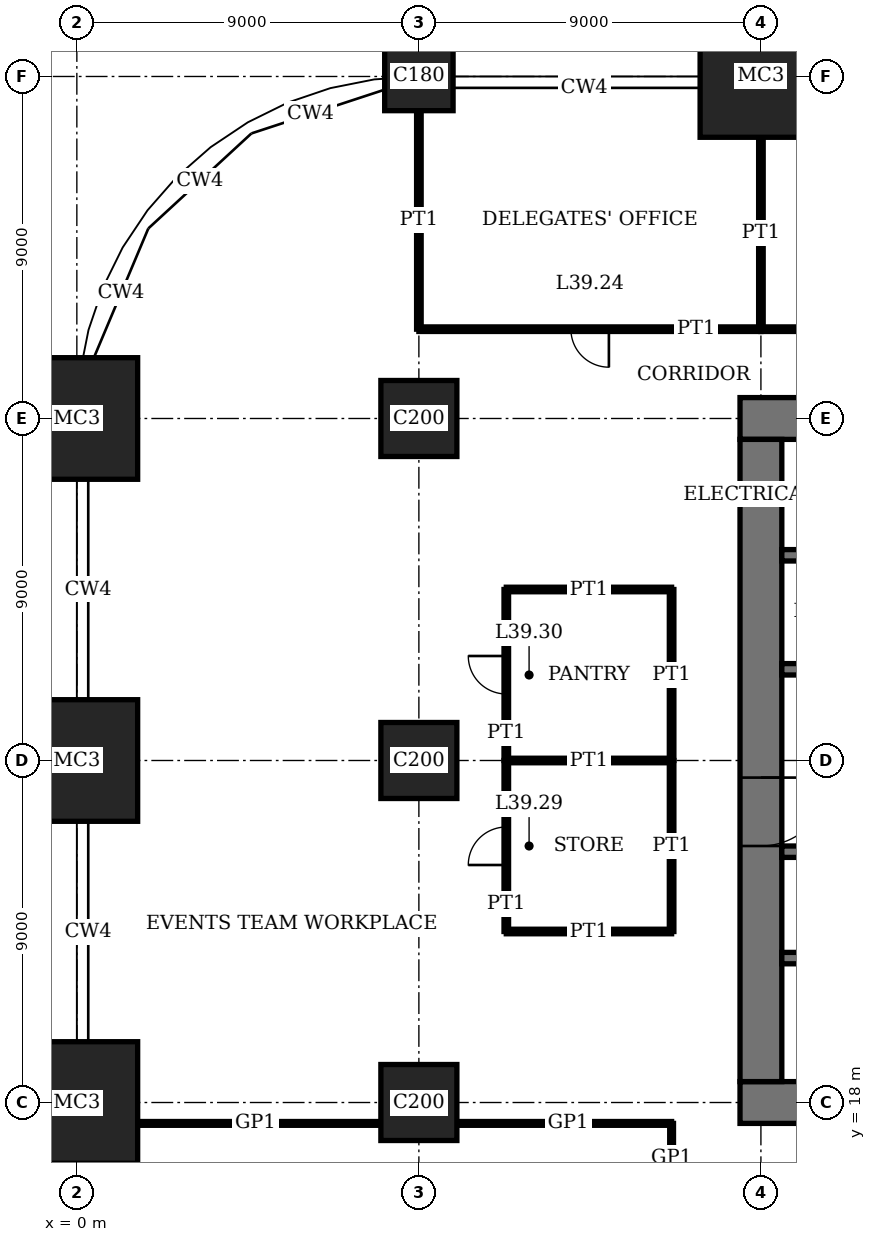
"""IFC4 building model, lengths in metres.
Left out: names, types, materials, properties, quantities, classifications, styles, units other than length and angle.
Written with IfcOpenShell. Run it as: python <this file> out.ifc"""

import sys

from ifc_helpers import new_model, si_unit, direction, frame, frame_2d, origin, origin_2d, place, context, subcontext, project, spatial, rectangle, extrude, element, fill, save


model = new_model("IFC4")
c1 = context("Model", 3, precision=1e-05, world=origin(), true_north=direction((0.0, 1.0)))
c2 = subcontext(c1, "Body", "Model", "MODEL_VIEW")
j1 = project(units=[si_unit("LENGTHUNIT", "METRE"), si_unit("PLANEANGLEUNIT", "RADIAN")], contexts=[c1])
p1 = place(None, origin())
s1 = spatial("IfcSite", under=j1, at=p1, CompositionType="ELEMENT")
p2 = place(p1, origin())
s2 = spatial("IfcBuilding", under=s1, at=p2, CompositionType="ELEMENT")
p3 = place(p2, frame((0.0, 0.0, 162.2)))
s3 = spatial("IfcBuildingStorey", under=s2, at=p3, CompositionType="ELEMENT", Elevation=162.2)
for number, where, z_axis, x_axis in (
    (1, (0.0, 18.0, 0.0), (0.0, 0.0, 1.0), (1.0, 0.0, 0.0)),
    (2, (0.0, 27.0, 0.0), (0.0, 0.0, 1.0), (1.0, 0.0, 0.0)),
    (3, (0.0, 36.0, 0.0), (0.0, 0.0, 1.0), (1.0, 0.0, 0.0)),
):
    element("IfcColumn", number, at=place(p3, frame(where, z_axis=z_axis, x_axis=x_axis)), inside=s3, PredefinedType="COLUMN", context=c2, shape_type="SweptSolid", body=[
        extrude(rectangle(XDim=3.2, YDim=3.2, at=origin_2d()), origin(), (0.0, 0.0, 1.0), 4.0),
    ])
for number, where, z_axis, x_axis in (
    (4, (9.0, 18.0, 0.0), (0.0, 0.0, 1.0), (1.0, 0.0, 0.0)),
    (5, (9.0, 27.0, 0.0), (0.0, 0.0, 1.0), (1.0, 0.0, 0.0)),
    (6, (9.0, 36.0, 0.0), (0.0, 0.0, 1.0), (1.0, 0.0, 0.0)),
):
    element("IfcColumn", number, at=place(p3, frame(where, z_axis=z_axis, x_axis=x_axis)), inside=s3, PredefinedType="COLUMN", context=c2, shape_type="SweptSolid", body=[
        extrude(rectangle(XDim=2.0, YDim=2.0, at=origin_2d()), origin(), (0.0, 0.0, 1.0), 4.0),
    ])
p4 = place(p3, frame((9.0, 45.0, 0.0), z_axis=(0.0, 0.0, 1.0), x_axis=(1.0, 0.0, 0.0)))
e7 = element("IfcColumn", 7, at=p4, inside=s3, PredefinedType="COLUMN", context=c2, shape_type="SweptSolid", body=[
    extrude(rectangle(XDim=1.8, YDim=1.8, at=origin_2d()), origin(), (0.0, 0.0, 1.0), 4.0),
])
p5 = place(p3, frame((18.0, 45.0, 0.0), z_axis=(0.0, 0.0, 1.0), x_axis=(1.0, 0.0, 0.0)))
e8 = element("IfcColumn", 8, at=p5, inside=s3, PredefinedType="COLUMN", context=c2, shape_type="SweptSolid", body=[
    extrude(rectangle(XDim=3.2, YDim=3.2, at=origin_2d()), origin(), (0.0, 0.0, 1.0), 4.0),
])
p6 = place(p3, frame((17.45, 18.0, 0.0), z_axis=(0.0, 0.0, 1.0), x_axis=(1.0, 0.0, 0.0)))
e9 = element("IfcWall", 9, at=p6, inside=s3, PredefinedType="SHEAR", context=c2, shape_type="SweptSolid", body=[
    extrude(rectangle(XDim=28.1, YDim=1.1, at=frame_2d((14.05, 0.0))), origin(), (0.0, 0.0, 1.0), 4.0),
])
p7 = place(p6, frame((11.55, 0.0, 0.0)))
e10 = element("IfcOpeningElement", 10, at=p7, cuts=e9, PredefinedType="OPENING", context=c2, shape_type="SweptSolid", body=[
    extrude(rectangle(XDim=1.0, YDim=2.4, at=frame_2d((0.5, 1.2))), frame((0.0, 0.56, 0.0), z_axis=(0.0, -1.0, 0.0), x_axis=(1.0, 0.0, 0.0)), (0.0, 0.0, 1.0), 1.12),
])
p8 = place(p6, frame((16.55, 0.0, 0.0)))
e11 = element("IfcOpeningElement", 11, at=p8, cuts=e9, PredefinedType="OPENING", context=c2, shape_type="SweptSolid", body=[
    extrude(rectangle(XDim=1.0, YDim=2.4, at=frame_2d((0.5, 1.2))), frame((0.0, 0.56, 0.0), z_axis=(0.0, -1.0, 0.0), x_axis=(1.0, 0.0, 0.0)), (0.0, 0.0, 1.0), 1.12),
])
p9 = place(p6, frame((20.0, 0.0, 0.0)))
e12 = element("IfcOpeningElement", 12, at=p9, cuts=e9, PredefinedType="OPENING", context=c2, shape_type="SweptSolid", body=[
    extrude(rectangle(XDim=1.1, YDim=2.4, at=frame_2d((0.55, 1.2))), frame((0.0, 0.56, 0.0), z_axis=(0.0, -1.0, 0.0), x_axis=(1.0, 0.0, 0.0)), (0.0, 0.0, 1.0), 1.12),
])
p10 = place(p6, frame((24.05, 0.0, 0.0)))
e13 = element("IfcOpeningElement", 13, at=p10, cuts=e9, PredefinedType="OPENING", context=c2, shape_type="SweptSolid", body=[
    extrude(rectangle(XDim=1.0, YDim=2.4, at=frame_2d((0.5, 1.2))), frame((0.0, 0.56, 0.0), z_axis=(0.0, -1.0, 0.0), x_axis=(1.0, 0.0, 0.0)), (0.0, 0.0, 1.0), 1.12),
])
p11 = place(p3, frame((45.55, 36.0, 0.0), z_axis=(0.0, 0.0, 1.0), x_axis=(-1.0, 0.0, 0.0)))
e14 = element("IfcWall", 14, at=p11, inside=s3, PredefinedType="SHEAR", context=c2, shape_type="SweptSolid", body=[
    extrude(rectangle(XDim=28.1, YDim=1.1, at=frame_2d((14.05, 0.0))), origin(), (0.0, 0.0, 1.0), 4.0),
])
p12 = place(p11, frame((11.55, 0.0, 0.0)))
e15 = element("IfcOpeningElement", 15, at=p12, cuts=e14, PredefinedType="OPENING", context=c2, shape_type="SweptSolid", body=[
    extrude(rectangle(XDim=1.0, YDim=2.4, at=frame_2d((0.5, 1.2))), frame((0.0, 0.56, 0.0), z_axis=(0.0, -1.0, 0.0), x_axis=(1.0, 0.0, 0.0)), (0.0, 0.0, 1.0), 1.12),
])
p13 = place(p11, frame((16.55, 0.0, 0.0)))
e16 = element("IfcOpeningElement", 16, at=p13, cuts=e14, PredefinedType="OPENING", context=c2, shape_type="SweptSolid", body=[
    extrude(rectangle(XDim=1.0, YDim=2.4, at=frame_2d((0.5, 1.2))), frame((0.0, 0.56, 0.0), z_axis=(0.0, -1.0, 0.0), x_axis=(1.0, 0.0, 0.0)), (0.0, 0.0, 1.0), 1.12),
])
p14 = place(p11, frame((20.0, 0.0, 0.0)))
e17 = element("IfcOpeningElement", 17, at=p14, cuts=e14, PredefinedType="OPENING", context=c2, shape_type="SweptSolid", body=[
    extrude(rectangle(XDim=1.1, YDim=2.4, at=frame_2d((0.55, 1.2))), frame((0.0, 0.56, 0.0), z_axis=(0.0, -1.0, 0.0), x_axis=(1.0, 0.0, 0.0)), (0.0, 0.0, 1.0), 1.12),
])
p15 = place(p11, frame((24.05, 0.0, 0.0)))
e18 = element("IfcOpeningElement", 18, at=p15, cuts=e14, PredefinedType="OPENING", context=c2, shape_type="SweptSolid", body=[
    extrude(rectangle(XDim=1.0, YDim=2.4, at=frame_2d((0.5, 1.2))), frame((0.0, 0.56, 0.0), z_axis=(0.0, -1.0, 0.0), x_axis=(1.0, 0.0, 0.0)), (0.0, 0.0, 1.0), 1.12),
])
p16 = place(p3, frame((18.0, 35.45, 0.0), z_axis=(0.0, 0.0, 1.0), x_axis=(0.0, -1.0, 0.0)))
e19 = element("IfcWall", 19, at=p16, inside=s3, PredefinedType="SHEAR", context=c2, shape_type="SweptSolid", body=[
    extrude(rectangle(XDim=16.9, YDim=1.1, at=frame_2d((8.45, 0.0))), origin(), (0.0, 0.0, 1.0), 4.0),
])
p17 = place(p16, frame((8.9, 0.0, 0.0)))
e20 = element("IfcOpeningElement", 20, at=p17, cuts=e19, PredefinedType="OPENING", context=c2, shape_type="SweptSolid", body=[
    extrude(rectangle(XDim=1.8, YDim=2.4, at=frame_2d((0.9, 1.2))), frame((0.0, 0.56, 0.0), z_axis=(0.0, -1.0, 0.0), x_axis=(1.0, 0.0, 0.0)), (0.0, 0.0, 1.0), 1.12),
])
p18 = place(p3, frame((18.55, 21.8, 0.0), z_axis=(0.0, 0.0, 1.0), x_axis=(1.0, 0.0, 0.0)))
e21 = element("IfcWall", 21, at=p18, inside=s3, PredefinedType="SHEAR", context=c2, shape_type="SweptSolid", body=[
    extrude(rectangle(XDim=8.3, YDim=0.3, at=frame_2d((4.15, 0.0))), origin(), (0.0, 0.0, 1.0), 4.0),
])
p19 = place(p18, frame((6.85, 0.0, 0.0)))
e22 = element("IfcOpeningElement", 22, at=p19, cuts=e21, PredefinedType="OPENING", context=c2, shape_type="SweptSolid", body=[
    extrude(rectangle(XDim=1.0, YDim=2.4, at=frame_2d((0.5, 1.2))), frame((0.0, 0.16, 0.0), z_axis=(0.0, -1.0, 0.0), x_axis=(1.0, 0.0, 0.0)), (0.0, 0.0, 1.0), 0.32),
])
p20 = place(p3, frame((18.55, 24.6, 0.0), z_axis=(0.0, 0.0, 1.0), x_axis=(1.0, 0.0, 0.0)))
e23 = element("IfcWall", 23, at=p20, inside=s3, PredefinedType="SHEAR", context=c2, shape_type="SweptSolid", body=[
    extrude(rectangle(XDim=25.9, YDim=0.3, at=frame_2d((12.95, 0.0))), origin(), (0.0, 0.0, 1.0), 4.0),
])
p21 = place(p20, frame((4.95, 0.0, 0.0)))
e24 = element("IfcOpeningElement", 24, at=p21, cuts=e23, PredefinedType="OPENING", context=c2, shape_type="SweptSolid", body=[
    extrude(rectangle(XDim=1.0, YDim=2.4, at=frame_2d((0.5, 1.2))), frame((0.0, 0.16, 0.0), z_axis=(0.0, -1.0, 0.0), x_axis=(1.0, 0.0, 0.0)), (0.0, 0.0, 1.0), 0.32),
])
p22 = place(p20, frame((24.5, 0.0, 0.0)))
e25 = element("IfcOpeningElement", 25, at=p22, cuts=e23, PredefinedType="OPENING", context=c2, shape_type="SweptSolid", body=[
    extrude(rectangle(XDim=0.9, YDim=2.1, at=frame_2d((0.45, 1.05))), frame((0.0, 0.16, 0.0), z_axis=(0.0, -1.0, 0.0), x_axis=(1.0, 0.0, 0.0)), (0.0, 0.0, 1.0), 0.32),
])
p23 = place(p20, frame((21.3, 0.0, 0.0)))
e26 = element("IfcOpeningElement", 26, at=p23, cuts=e23, PredefinedType="OPENING", context=c2, shape_type="SweptSolid", body=[
    extrude(rectangle(XDim=1.3, YDim=2.4, at=frame_2d((0.65, 1.2))), frame((0.0, 0.16, 0.0), z_axis=(0.0, -1.0, 0.0), x_axis=(1.0, 0.0, 0.0)), (0.0, 0.0, 1.0), 0.32),
])
p24 = place(p3, frame((18.55, 29.4, 0.0), z_axis=(0.0, 0.0, 1.0), x_axis=(1.0, 0.0, 0.0)))
e27 = element("IfcWall", 27, at=p24, inside=s3, PredefinedType="SHEAR", context=c2, shape_type="SweptSolid", body=[
    extrude(rectangle(XDim=25.9, YDim=0.3, at=frame_2d((12.95, 0.0))), origin(), (0.0, 0.0, 1.0), 4.0),
])
p25 = place(p24, frame((19.95, 0.0, 0.0)))
e28 = element("IfcOpeningElement", 28, at=p25, cuts=e27, PredefinedType="OPENING", context=c2, shape_type="SweptSolid", body=[
    extrude(rectangle(XDim=1.0, YDim=2.4, at=frame_2d((0.5, 1.2))), frame((0.0, 0.16, 0.0), z_axis=(0.0, -1.0, 0.0), x_axis=(1.0, 0.0, 0.0)), (0.0, 0.0, 1.0), 0.32),
])
p26 = place(p24, frame((0.5, 0.0, 0.0)))
e29 = element("IfcOpeningElement", 29, at=p26, cuts=e27, PredefinedType="OPENING", context=c2, shape_type="SweptSolid", body=[
    extrude(rectangle(XDim=0.9, YDim=2.1, at=frame_2d((0.45, 1.05))), frame((0.0, 0.16, 0.0), z_axis=(0.0, -1.0, 0.0), x_axis=(1.0, 0.0, 0.0)), (0.0, 0.0, 1.0), 0.32),
])
p27 = place(p24, frame((15.45, 0.0, 0.0)))
e30 = element("IfcOpeningElement", 30, at=p27, cuts=e27, PredefinedType="OPENING", context=c2, shape_type="SweptSolid", body=[
    extrude(rectangle(XDim=1.0, YDim=2.4, at=frame_2d((0.5, 1.2))), frame((0.0, 0.16, 0.0), z_axis=(0.0, -1.0, 0.0), x_axis=(1.0, 0.0, 0.0)), (0.0, 0.0, 1.0), 0.32),
])
p28 = place(p24, frame((12.45, 0.0, 0.0)))
e31 = element("IfcOpeningElement", 31, at=p28, cuts=e27, PredefinedType="OPENING", context=c2, shape_type="SweptSolid", body=[
    extrude(rectangle(XDim=1.0, YDim=2.4, at=frame_2d((0.5, 1.2))), frame((0.0, 0.16, 0.0), z_axis=(0.0, -1.0, 0.0), x_axis=(1.0, 0.0, 0.0)), (0.0, 0.0, 1.0), 0.32),
])
p29 = place(p24, frame((9.4, 0.0, 0.0)))
e32 = element("IfcOpeningElement", 32, at=p29, cuts=e27, PredefinedType="OPENING", context=c2, shape_type="SweptSolid", body=[
    extrude(rectangle(XDim=1.1, YDim=2.4, at=frame_2d((0.55, 1.2))), frame((0.0, 0.16, 0.0), z_axis=(0.0, -1.0, 0.0), x_axis=(1.0, 0.0, 0.0)), (0.0, 0.0, 1.0), 0.32),
])
p30 = place(p24, frame((6.4, 0.0, 0.0)))
e33 = element("IfcOpeningElement", 33, at=p30, cuts=e27, PredefinedType="OPENING", context=c2, shape_type="SweptSolid", body=[
    extrude(rectangle(XDim=1.1, YDim=2.4, at=frame_2d((0.55, 1.2))), frame((0.0, 0.16, 0.0), z_axis=(0.0, -1.0, 0.0), x_axis=(1.0, 0.0, 0.0)), (0.0, 0.0, 1.0), 0.32),
])
p31 = place(p24, frame((3.3, 0.0, 0.0)))
e34 = element("IfcOpeningElement", 34, at=p31, cuts=e27, PredefinedType="OPENING", context=c2, shape_type="SweptSolid", body=[
    extrude(rectangle(XDim=1.3, YDim=2.4, at=frame_2d((0.65, 1.2))), frame((0.0, 0.16, 0.0), z_axis=(0.0, -1.0, 0.0), x_axis=(1.0, 0.0, 0.0)), (0.0, 0.0, 1.0), 0.32),
])
p32 = place(p3, frame((18.55, 32.4, 0.0), z_axis=(0.0, 0.0, 1.0), x_axis=(1.0, 0.0, 0.0)))
e35 = element("IfcWall", 35, at=p32, inside=s3, PredefinedType="SHEAR", context=c2, shape_type="SweptSolid", body=[
    extrude(rectangle(XDim=17.3, YDim=0.3, at=frame_2d((8.65, 0.0))), origin(), (0.0, 0.0, 1.0), 4.0),
])
p33 = place(p3, frame((1.6, 17.45, 0.0), z_axis=(0.0, 0.0, 1.0), x_axis=(1.0, 0.0, 0.0)))
e36 = element("IfcWall", 36, at=p33, inside=s3, PredefinedType="PARTITIONING", context=c2, shape_type="SweptSolid", body=[
    extrude(rectangle(XDim=6.4, YDim=0.1, at=frame_2d((3.2, 0.0))), origin(), (0.0, 0.0, 1.0), 3.05),
])
p34 = place(p3, frame((10.0, 17.45, 0.0), z_axis=(0.0, 0.0, 1.0), x_axis=(1.0, 0.0, 0.0)))
e37 = element("IfcWall", 37, at=p34, inside=s3, PredefinedType="PARTITIONING", context=c2, shape_type="SweptSolid", body=[
    extrude(rectangle(XDim=5.65, YDim=0.1, at=frame_2d((2.825, 0.0))), origin(), (0.0, 0.0, 1.0), 3.05),
])
p35 = place(p3, frame((11.3, 22.5, 0.0), z_axis=(0.0, 0.0, 1.0), x_axis=(1.0, 0.0, 0.0)))
e38 = element("IfcWall", 38, at=p35, inside=s3, PredefinedType="PARTITIONING", context=c2, shape_type="SweptSolid", body=[
    extrude(rectangle(XDim=4.35, YDim=0.12, at=frame_2d((2.175, 0.0))), origin(), (0.0, 0.0, 1.0), 3.1),
])
p36 = place(p3, frame((11.3, 27.0, 0.0), z_axis=(0.0, 0.0, 1.0), x_axis=(1.0, 0.0, 0.0)))
e39 = element("IfcWall", 39, at=p36, inside=s3, PredefinedType="PARTITIONING", context=c2, shape_type="SweptSolid", body=[
    extrude(rectangle(XDim=4.35, YDim=0.12, at=frame_2d((2.175, 0.0))), origin(), (0.0, 0.0, 1.0), 3.05),
])
p37 = place(p3, frame((11.3, 31.5, 0.0), z_axis=(0.0, 0.0, 1.0), x_axis=(1.0, 0.0, 0.0)))
e40 = element("IfcWall", 40, at=p37, inside=s3, PredefinedType="PARTITIONING", context=c2, shape_type="SweptSolid", body=[
    extrude(rectangle(XDim=4.35, YDim=0.12, at=frame_2d((2.175, 0.0))), origin(), (0.0, 0.0, 1.0), 3.1),
])
p38 = place(p3, frame((9.0, 38.35, 0.0), z_axis=(0.0, 0.0, 1.0), x_axis=(1.0, 0.0, 0.0)))
e41 = element("IfcWall", 41, at=p38, inside=s3, PredefinedType="PARTITIONING", context=c2, shape_type="SweptSolid", body=[
    extrude(rectangle(XDim=9.0, YDim=0.12, at=frame_2d((4.5, 0.0))), origin(), (0.0, 0.0, 1.0), 3.75),
])
p39 = place(p38, frame((4.0, 0.0, 0.0)))
e42 = element("IfcOpeningElement", 42, at=p39, cuts=e41, PredefinedType="OPENING", context=c2, shape_type="SweptSolid", body=[
    extrude(rectangle(XDim=1.0, YDim=2.4, at=frame_2d((0.5, 1.2))), frame((0.0, 0.07, 0.0), z_axis=(0.0, -1.0, 0.0), x_axis=(1.0, 0.0, 0.0)), (0.0, 0.0, 1.0), 0.14),
])
p40 = place(p3, frame((18.0, 38.35, 0.0), z_axis=(0.0, 0.0, 1.0), x_axis=(1.0, 0.0, 0.0)))
e43 = element("IfcWall", 43, at=p40, inside=s3, PredefinedType="PARTITIONING", context=c2, shape_type="SweptSolid", body=[
    extrude(rectangle(XDim=9.0, YDim=0.12, at=frame_2d((4.5, 0.0))), origin(), (0.0, 0.0, 1.0), 3.75),
])
p41 = place(p40, frame((4.0, 0.0, 0.0)))
e44 = element("IfcOpeningElement", 44, at=p41, cuts=e43, PredefinedType="OPENING", context=c2, shape_type="SweptSolid", body=[
    extrude(rectangle(XDim=1.0, YDim=2.4, at=frame_2d((0.5, 1.2))), frame((0.0, 0.07, 0.0), z_axis=(0.0, -1.0, 0.0), x_axis=(1.0, 0.0, 0.0)), (0.0, 0.0, 1.0), 0.14),
])
p42 = place(p3, frame((9.0, 38.35, 0.0), z_axis=(0.0, 0.0, 1.0), x_axis=(0.0, 1.0, 0.0)))
e45 = element("IfcWall", 45, at=p42, inside=s3, PredefinedType="PARTITIONING", context=c2, shape_type="SweptSolid", body=[
    extrude(rectangle(XDim=5.75, YDim=0.12, at=frame_2d((2.875, 0.0))), origin(), (0.0, 0.0, 1.0), 3.05),
])
p43 = place(p3, frame((11.3, 22.5, 0.0), z_axis=(0.0, 0.0, 1.0), x_axis=(0.0, 1.0, 0.0)))
e46 = element("IfcWall", 46, at=p43, inside=s3, PredefinedType="PARTITIONING", context=c2, shape_type="SweptSolid", body=[
    extrude(rectangle(XDim=4.5, YDim=0.12, at=frame_2d((2.25, 0.0))), origin(), (0.0, 0.0, 1.0), 3.75),
])
p44 = place(p43, frame((1.75, 0.0, 0.0)))
e47 = element("IfcOpeningElement", 47, at=p44, cuts=e46, PredefinedType="OPENING", context=c2, shape_type="SweptSolid", body=[
    extrude(rectangle(XDim=1.0, YDim=2.4, at=frame_2d((0.5, 1.2))), frame((0.0, 0.07, 0.0), z_axis=(0.0, -1.0, 0.0), x_axis=(1.0, 0.0, 0.0)), (0.0, 0.0, 1.0), 0.14),
])
p45 = place(p3, frame((11.3, 27.0, 0.0), z_axis=(0.0, 0.0, 1.0), x_axis=(0.0, 1.0, 0.0)))
e48 = element("IfcWall", 48, at=p45, inside=s3, PredefinedType="PARTITIONING", context=c2, shape_type="SweptSolid", body=[
    extrude(rectangle(XDim=4.5, YDim=0.12, at=frame_2d((2.25, 0.0))), origin(), (0.0, 0.0, 1.0), 3.75),
])
p46 = place(p45, frame((1.75, 0.0, 0.0)))
e49 = element("IfcOpeningElement", 49, at=p46, cuts=e48, PredefinedType="OPENING", context=c2, shape_type="SweptSolid", body=[
    extrude(rectangle(XDim=1.0, YDim=2.4, at=frame_2d((0.5, 1.2))), frame((0.0, 0.07, 0.0), z_axis=(0.0, -1.0, 0.0), x_axis=(1.0, 0.0, 0.0)), (0.0, 0.0, 1.0), 0.14),
])
for number, where, z_axis, x_axis in (
    (50, (15.65, 22.5, 0.0), (0.0, 0.0, 1.0), (0.0, 1.0, 0.0)),
    (51, (15.65, 27.0, 0.0), (0.0, 0.0, 1.0), (0.0, 1.0, 0.0)),
):
    element("IfcWall", number, at=place(p3, frame(where, z_axis=z_axis, x_axis=x_axis)), inside=s3, PredefinedType="PARTITIONING", context=c2, shape_type="SweptSolid", body=[
        extrude(rectangle(XDim=4.5, YDim=0.12, at=frame_2d((2.25, 0.0))), origin(), (0.0, 0.0, 1.0), 3.75),
    ])
p47 = place(p3, frame((15.65, 15.65, 0.0), z_axis=(0.0, 0.0, 1.0), x_axis=(0.0, 1.0, 0.0)))
e52 = element("IfcWall", 52, at=p47, inside=s3, PredefinedType="PARTITIONING", context=c2, shape_type="SweptSolid", body=[
    extrude(rectangle(XDim=1.8, YDim=0.1, at=frame_2d((0.9, 0.0))), origin(), (0.0, 0.0, 1.0), 3.75),
])
p48 = place(p3, frame((18.0, 38.35, 0.0), z_axis=(0.0, 0.0, 1.0), x_axis=(0.0, 1.0, 0.0)))
e53 = element("IfcWall", 53, at=p48, inside=s3, PredefinedType="PARTITIONING", context=c2, shape_type="SweptSolid", body=[
    extrude(rectangle(XDim=5.05, YDim=0.12, at=frame_2d((2.525, 0.0))), origin(), (0.0, 0.0, 1.0), 3.05),
])
p49 = place(p17, origin())
e54 = element("IfcDoor", 54, at=p49, inside=s3, OperationType="DOUBLE_DOOR_DOUBLE_SWING", PredefinedType="DOOR", context=c2, shape_type="SweptSolid", body=[
    extrude(rectangle(XDim=1.8, YDim=2.4, at=frame_2d((0.9, 1.2))), frame((0.0, 0.03, 0.0), z_axis=(0.0, -1.0, 0.0), x_axis=(1.0, 0.0, 0.0)), (0.0, 0.0, 1.0), 0.06),
    extrude(rectangle(XDim=0.04, YDim=2.4, at=frame_2d((0.02, 1.2))), frame((0.0, 0.55, 0.0), z_axis=(0.0, -1.0, 0.0), x_axis=(1.0, 0.0, 0.0)), (0.0, 0.0, 1.0), 1.1),
    extrude(rectangle(XDim=0.04, YDim=2.4, at=frame_2d((1.78, 1.2))), frame((0.0, 0.55, 0.0), z_axis=(0.0, -1.0, 0.0), x_axis=(1.0, 0.0, 0.0)), (0.0, 0.0, 1.0), 1.1),
    extrude(rectangle(XDim=1.8, YDim=0.04, at=frame_2d((0.9, 2.38))), frame((0.0, 0.55, 0.0), z_axis=(0.0, -1.0, 0.0), x_axis=(1.0, 0.0, 0.0)), (0.0, 0.0, 1.0), 1.1),
])
fill(e20, e54)
p50 = place(p39, origin())
e55 = element("IfcDoor", 55, at=p50, inside=s3, OperationType="SINGLE_SWING_RIGHT", PredefinedType="DOOR", context=c2, shape_type="SweptSolid", body=[
    extrude(rectangle(XDim=1.0, YDim=2.4, at=frame_2d((0.5, 1.2))), frame((0.0, 0.025, 0.0), z_axis=(0.0, -1.0, 0.0), x_axis=(1.0, 0.0, 0.0)), (0.0, 0.0, 1.0), 0.05),
])
fill(e42, e55)
p51 = place(p44, origin())
e56 = element("IfcDoor", 56, at=p51, inside=s3, OperationType="SINGLE_SWING_RIGHT", PredefinedType="DOOR", context=c2, shape_type="SweptSolid", body=[
    extrude(rectangle(XDim=1.0, YDim=2.4, at=frame_2d((0.5, 1.2))), frame((0.0, 0.025, 0.0), z_axis=(0.0, -1.0, 0.0), x_axis=(1.0, 0.0, 0.0)), (0.0, 0.0, 1.0), 0.05),
])
fill(e47, e56)
p52 = place(p46, origin())
e57 = element("IfcDoor", 57, at=p52, inside=s3, OperationType="SINGLE_SWING_LEFT", PredefinedType="DOOR", context=c2, shape_type="SweptSolid", body=[
    extrude(rectangle(XDim=1.0, YDim=2.4, at=frame_2d((0.5, 1.2))), frame((0.0, 0.025, 0.0), z_axis=(0.0, -1.0, 0.0), x_axis=(1.0, 0.0, 0.0)), (0.0, 0.0, 1.0), 0.05),
])
fill(e49, e57)
save(model, sys.argv[1])
